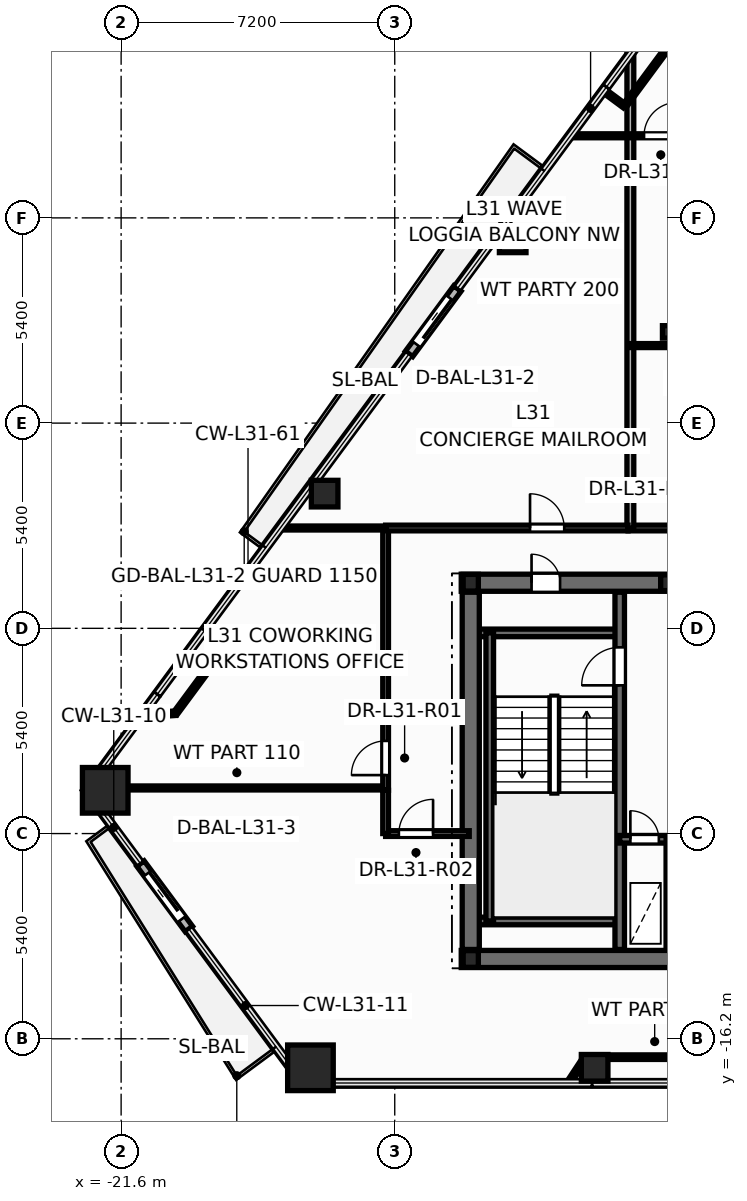
"""IFC4 building model, lengths in metres.
Left out: names, types, materials, properties, quantities, classifications, styles, units other than length and angle.
Written with IfcOpenShell. Run it as: python <this file> out.ifc"""

import sys

from ifc_helpers import new_model, si_unit, direction, frame, frame_2d, origin, origin_2d, place, context, subcontext, project, spatial, rectangle, hollow_rectangle, hollow_circle, i_section, extrude, element, fill, save


model = new_model("IFC4")
c1 = context("Model", 3, precision=1e-05, world=origin(), true_north=direction((0.0, 1.0)))
c2 = subcontext(c1, "Body", "Model", "MODEL_VIEW")
j1 = project(units=[si_unit("LENGTHUNIT", "METRE"), si_unit("PLANEANGLEUNIT", "RADIAN")], contexts=[c1])
p1 = place(None, origin())
s1 = spatial("IfcSite", under=j1, at=p1, CompositionType="ELEMENT")
p2 = place(p1, origin())
s2 = spatial("IfcBuilding", under=s1, at=p2, CompositionType="ELEMENT")
p3 = place(p2, frame((0.0, 0.0, 122.1)))
s3 = spatial("IfcBuildingStorey", under=s2, at=p3, CompositionType="ELEMENT", Elevation=122.1)
for number, where, z_axis, x_axis in (
    (1, (-22.019, -9.662, 0.0), (0.0, 0.0, 1.0), (1.0, 0.0, 0.0)),
    (2, (-16.618, -16.963, 0.0), (0.0, 0.0, 1.0), (1.0, 0.0, 0.0)),
):
    element("IfcColumn", number, at=place(p3, frame(where, z_axis=z_axis, x_axis=x_axis)), inside=s3, PredefinedType="COLUMN", context=c2, shape_type="SweptSolid", body=[
        extrude(hollow_rectangle(XDim=1.2, YDim=1.2, WallThickness=0.055, at=origin_2d()), origin(), (0.0, 0.0, 1.0), 3.6),
    ])
for number, where, z_axis, x_axis in (
    (3, (-9.14, -16.963, 0.0), (0.0, 0.0, 1.0), (1.0, 0.0, 0.0)),
    (4, (-11.296, 4.836, 0.0), (0.0, 0.0, 1.0), (1.0, 0.0, 0.0)),
    (5, (-16.245, -1.856, 0.0), (0.0, 0.0, 1.0), (1.0, 0.0, 0.0)),
):
    element("IfcColumn", number, at=place(p3, frame(where, z_axis=z_axis, x_axis=x_axis)), inside=s3, PredefinedType="COLUMN", context=c2, shape_type="SweptSolid", body=[
        extrude(hollow_circle(Radius=0.35, WallThickness=0.03, at=origin_2d()), origin(), (0.0, 0.0, 1.0), 3.6),
    ])
for number, where, z_axis, x_axis in (
    (6, (-12.4, -14.1, 0.0), (0.0, 0.0, 1.0), (1.0, 0.0, 0.0)),
    (7, (-12.4, -4.2, 0.0), (0.0, 0.0, 1.0), (1.0, 0.0, 0.0)),
):
    element("IfcColumn", number, at=place(p3, frame(where, z_axis=z_axis, x_axis=x_axis)), inside=s3, PredefinedType="COLUMN", context=c2, shape_type="SweptSolid", body=[
        extrude(i_section(OverallWidth=0.4, OverallDepth=0.44, WebThickness=0.028, FlangeThickness=0.04, at=origin_2d()), origin(), (0.0, 0.0, 1.0), 3.6),
    ])
p4 = place(p3, frame((-7.2, -4.2, 0.0), z_axis=(0.0, 0.0, 1.0), x_axis=(1.0, 0.0, 0.0)))
e8 = element("IfcColumn", 8, at=p4, inside=s3, PredefinedType="PILASTER", context=c2, shape_type="SweptSolid", body=[
    extrude(i_section(OverallWidth=0.405, OverallDepth=0.414, WebThickness=0.022, FlangeThickness=0.032, at=origin_2d()), origin(), (0.0, 0.0, 1.0), 3.6),
])
p5 = place(p3, frame((-7.2, 2.4, 0.0), z_axis=(0.0, 0.0, 1.0), x_axis=(1.0, 0.0, 0.0)))
e9 = element("IfcColumn", 9, at=p5, inside=s3, PredefinedType="COLUMN", context=c2, shape_type="SweptSolid", body=[
    extrude(i_section(OverallWidth=0.311, OverallDepth=0.327, WebThickness=0.016, FlangeThickness=0.025, at=origin_2d()), origin(), (0.0, 0.0, 1.0), 3.6),
])
p6 = place(p3, frame((-12.751, 3.541, -0.015), z_axis=(0.0, 0.0, 1.0), x_axis=(-0.594638042479, -0.80399353134, 0.0)))
e10 = element("IfcWall", 10, at=p6, inside=s3, PredefinedType="STANDARD", context=c2, shape_type="SweptSolid", body=[
    extrude(rectangle(XDim=2.14, YDim=0.24, at=frame_2d((1.07, 0.0))), origin(), (0.0, 0.0, 1.0), 2.807),
])
p7 = place(p6, frame((0.32, 0.0, 0.015)))
e11 = element("IfcOpeningElement", 11, at=p7, cuts=e10, PredefinedType="OPENING", context=c2, shape_type="SweptSolid", body=[
    extrude(rectangle(XDim=1.506, YDim=2.204, at=frame_2d((0.75, 1.102))), frame((0.0, 0.13, 0.0), z_axis=(0.0, -1.0, 0.0), x_axis=(1.0, 0.0, 0.0)), (0.0, 0.0, 1.0), 0.26),
])
p8 = place(p3, frame((-21.09, -11.59, -0.015), z_axis=(0.0, 0.0, 1.0), x_axis=(0.594638042479, -0.80399353134, 0.0)))
e12 = element("IfcWall", 12, at=p8, inside=s3, PredefinedType="STANDARD", context=c2, shape_type="SweptSolid", body=[
    extrude(rectangle(XDim=2.14, YDim=0.24, at=frame_2d((1.07, 0.0))), origin(), (0.0, 0.0, 1.0), 2.807),
])
p9 = place(p8, frame((0.32, 0.0, 0.015)))
e13 = element("IfcOpeningElement", 13, at=p9, cuts=e12, PredefinedType="OPENING", context=c2, shape_type="SweptSolid", body=[
    extrude(rectangle(XDim=1.506, YDim=2.204, at=frame_2d((0.75, 1.102))), frame((0.0, 0.13, 0.0), z_axis=(0.0, -1.0, 0.0), x_axis=(1.0, 0.0, 0.0)), (0.0, 0.0, 1.0), 0.26),
])
p10 = place(p3, frame((-12.65, -14.1, 0.0), z_axis=(0.0, 0.0, 1.0), x_axis=(1.0, 0.0, 0.0)))
e14 = element("IfcWall", 14, at=p10, inside=s3, PredefinedType="SHEAR", context=c2, shape_type="SweptSolid", body=[
    extrude(rectangle(XDim=25.3, YDim=0.45, at=frame_2d((12.65, 0.0))), origin(), (0.0, 0.0, 1.0), 3.6),
])
p11 = place(p3, frame((-12.65, -4.2, 0.0), z_axis=(0.0, 0.0, 1.0), x_axis=(1.0, 0.0, 0.0)))
e15 = element("IfcWall", 15, at=p11, inside=s3, PredefinedType="SHEAR", context=c2, shape_type="SweptSolid", body=[
    extrude(rectangle(XDim=25.3, YDim=0.45, at=frame_2d((12.65, 0.0))), origin(), (0.0, 0.0, 1.0), 3.6),
])
p12 = place(p11, frame((1.85, 0.0, 0.0)))
e16 = element("IfcOpeningElement", 16, at=p12, cuts=e15, PredefinedType="OPENING", context=c2, shape_type="SweptSolid", body=[
    extrude(rectangle(XDim=0.756, YDim=2.054, at=frame_2d((0.375, 1.027))), frame((0.0, 0.235, 0.0), z_axis=(0.0, -1.0, 0.0), x_axis=(1.0, 0.0, 0.0)), (0.0, 0.0, 1.0), 0.47),
])
p13 = place(p11, frame((21.85, 0.0, 0.0)))
e17 = element("IfcOpeningElement", 17, at=p13, cuts=e15, PredefinedType="OPENING", context=c2, shape_type="SweptSolid", body=[
    extrude(rectangle(XDim=0.756, YDim=2.054, at=frame_2d((0.375, 1.027))), frame((0.0, 0.235, 0.0), z_axis=(0.0, -1.0, 0.0), x_axis=(1.0, 0.0, 0.0)), (0.0, 0.0, 1.0), 0.47),
])
p14 = place(p11, frame((23.5, 0.0, 0.0)))
e18 = element("IfcOpeningElement", 18, at=p14, cuts=e15, PredefinedType="OPENING", context=c2, shape_type="SweptSolid", body=[
    extrude(rectangle(XDim=0.756, YDim=2.054, at=frame_2d((0.375, 1.027))), frame((0.0, 0.235, 0.0), z_axis=(0.0, -1.0, 0.0), x_axis=(1.0, 0.0, 0.0)), (0.0, 0.0, 1.0), 0.47),
])
p15 = place(p11, frame((5.85, 0.0, 0.0)))
e19 = element("IfcOpeningElement", 19, at=p15, cuts=e15, PredefinedType="OPENING", context=c2, shape_type="SweptSolid", body=[
    extrude(rectangle(XDim=1.006, YDim=2.104, at=frame_2d((0.5, 1.052))), frame((0.0, 0.235, 0.0), z_axis=(0.0, -1.0, 0.0), x_axis=(1.0, 0.0, 0.0)), (0.0, 0.0, 1.0), 0.47),
])
p16 = place(p11, frame((10.35, 0.0, 0.0)))
e20 = element("IfcOpeningElement", 20, at=p16, cuts=e15, PredefinedType="OPENING", context=c2, shape_type="SweptSolid", body=[
    extrude(rectangle(XDim=1.406, YDim=2.154, at=frame_2d((0.7, 1.077))), frame((0.0, 0.235, 0.0), z_axis=(0.0, -1.0, 0.0), x_axis=(1.0, 0.0, 0.0)), (0.0, 0.0, 1.0), 0.47),
])
p17 = place(p11, frame((18.45, 0.0, 0.0)))
e21 = element("IfcOpeningElement", 21, at=p17, cuts=e15, PredefinedType="OPENING", context=c2, shape_type="SweptSolid", body=[
    extrude(rectangle(XDim=1.006, YDim=2.104, at=frame_2d((0.5, 1.052))), frame((0.0, 0.235, 0.0), z_axis=(0.0, -1.0, 0.0), x_axis=(1.0, 0.0, 0.0)), (0.0, 0.0, 1.0), 0.47),
])
for number, where, z_axis, x_axis in (
    (22, (-12.35, -5.52, 0.0), (0.0, 0.0, 1.0), (1.0, 0.0, 0.0)),
    (23, (-12.35, -13.1, 0.0), (0.0, 0.0, 1.0), (1.0, 0.0, 0.0)),
):
    element("IfcWall", number, at=place(p3, frame(where, z_axis=z_axis, x_axis=x_axis)), inside=s3, PredefinedType="SOLIDWALL", context=c2, shape_type="SweptSolid", body=[
        extrude(rectangle(XDim=3.87, YDim=0.2, at=frame_2d((1.935, 0.0))), origin(), (0.0, 0.0, 1.0), 3.6),
    ])
p18 = place(p3, frame((-11.9, -13.1, 0.0), z_axis=(0.0, 0.0, 1.0), x_axis=(0.0, 1.0, 0.0)))
e24 = element("IfcWall", 24, at=p18, inside=s3, PredefinedType="SOLIDWALL", context=c2, shape_type="SweptSolid", body=[
    extrude(rectangle(XDim=7.58, YDim=0.2, at=frame_2d((3.79, 0.0))), origin(), (0.0, 0.0, 1.0), 3.6),
])
p19 = place(p3, frame((-8.48, -13.85, 0.0), z_axis=(0.0, 0.0, 1.0), x_axis=(0.0, 1.0, 0.0)))
e25 = element("IfcWall", 25, at=p19, inside=s3, PredefinedType="SHEAR", context=c2, shape_type="SweptSolid", body=[
    extrude(rectangle(XDim=9.4, YDim=0.25, at=frame_2d((4.7, 0.0))), origin(), (0.0, 0.0, 1.0), 3.6),
])
p20 = place(p19, frame((6.95, 0.0, 0.0)))
e26 = element("IfcOpeningElement", 26, at=p20, cuts=e25, PredefinedType="OPENING", context=c2, shape_type="SweptSolid", body=[
    extrude(rectangle(XDim=1.006, YDim=2.104, at=frame_2d((0.5, 1.052))), frame((0.0, 0.135, 0.0), z_axis=(0.0, -1.0, 0.0), x_axis=(1.0, 0.0, 0.0)), (0.0, 0.0, 1.0), 0.27),
])
p21 = place(p3, frame((-8.48, -10.95, 0.0), z_axis=(0.0, 0.0, 1.0), x_axis=(1.0, 0.0, 0.0)))
e27 = element("IfcWall", 27, at=p21, inside=s3, PredefinedType="SOLIDWALL", context=c2, shape_type="SweptSolid", body=[
    extrude(rectangle(XDim=3.36, YDim=0.2, at=frame_2d((1.68, 0.0))), origin(), (0.0, 0.0, 1.0), 3.6),
])
p22 = place(p21, frame((0.28, 0.0, 0.0)))
e28 = element("IfcOpeningElement", 28, at=p22, cuts=e27, PredefinedType="OPENING", context=c2, shape_type="SweptSolid", body=[
    extrude(rectangle(XDim=0.756, YDim=2.054, at=frame_2d((0.375, 1.027))), frame((0.0, 0.11, 0.0), z_axis=(0.0, -1.0, 0.0), x_axis=(1.0, 0.0, 0.0)), (0.0, 0.0, 1.0), 0.22),
])
p23 = place(p21, frame((1.85, 0.0, 0.0)))
e29 = element("IfcOpeningElement", 29, at=p23, cuts=e27, PredefinedType="OPENING", context=c2, shape_type="SweptSolid", body=[
    extrude(rectangle(XDim=1.106, YDim=2.104, at=frame_2d((0.55, 1.052))), frame((0.0, 0.11, 0.0), z_axis=(0.0, -1.0, 0.0), x_axis=(1.0, 0.0, 0.0)), (0.0, 0.0, 1.0), 0.22),
])
p24 = place(p3, frame((-7.18, -13.85, 0.0), z_axis=(0.0, 0.0, 1.0), x_axis=(0.0, 1.0, 0.0)))
e30 = element("IfcWall", 30, at=p24, inside=s3, PredefinedType="PARTITIONING", context=c2, shape_type="SweptSolid", body=[
    extrude(rectangle(XDim=2.9, YDim=0.16, at=frame_2d((1.45, 0.0))), origin(), (0.0, 0.0, 1.0), 2.475),
])
p25 = place(p3, frame((-12.4, -13.85, 0.0), z_axis=(0.0, 0.0, 1.0), x_axis=(0.0, 1.0, 0.0)))
e31 = element("IfcWall", 31, at=p25, inside=s3, PredefinedType="SHEAR", context=c2, shape_type="SweptSolid", body=[
    extrude(rectangle(XDim=9.4, YDim=0.45, at=frame_2d((4.7, 0.0))), origin(), (0.0, 0.0, 1.0), 3.6),
])
p26 = place(p3, frame((-8.26, -2.76, 0.0), z_axis=(0.0, 0.0, 1.0), x_axis=(1.0, 0.0, 0.0)))
e32 = element("IfcWall", 32, at=p26, inside=s3, PredefinedType="PARTITIONING", context=c2, shape_type="SweptSolid", body=[
    extrude(rectangle(XDim=8.9, YDim=0.15, at=frame_2d((4.45, 0.0))), origin(), (0.0, 0.0, 1.0), 2.325),
])
p27 = place(p26, frame((2.627, 0.0, 0.0)))
e33 = element("IfcOpeningElement", 33, at=p27, cuts=e32, PredefinedType="OPENING", context=c2, shape_type="SweptSolid", body=[
    extrude(rectangle(XDim=0.906, YDim=2.104, at=frame_2d((0.45, 1.052))), frame((0.0, 0.085, 0.0), z_axis=(0.0, -1.0, 0.0), x_axis=(1.0, 0.0, 0.0)), (0.0, 0.0, 1.0), 0.17),
])
p28 = place(p3, frame((-22.47, -9.6, 0.0), z_axis=(0.0, 0.0, 1.0), x_axis=(1.0, 0.0, 0.0)))
e34 = element("IfcWall", 34, at=p28, inside=s3, PredefinedType="PARTITIONING", context=c2, shape_type="SweptSolid", body=[
    extrude(rectangle(XDim=7.83, YDim=0.105, at=frame_2d((3.915, 0.0))), origin(), (0.0, 0.0, 1.0), 2.325),
])
p29 = place(p3, frame((-8.2, -2.76, 0.0), z_axis=(0.0, 0.0, 1.0), x_axis=(0.0, 1.0, 0.0)))
e35 = element("IfcWall", 35, at=p29, inside=s3, PredefinedType="PARTITIONING", context=c2, shape_type="SweptSolid", body=[
    extrude(rectangle(XDim=12.454, YDim=0.18, at=frame_2d((6.227, 0.0))), origin(), (0.0, 0.0, 1.0), 2.617),
])
p30 = place(p3, frame((-14.64, -9.66, 0.0), z_axis=(0.0, 0.0, 1.0), x_axis=(0.0, 1.0, 0.0)))
e36 = element("IfcWall", 36, at=p30, inside=s3, PredefinedType="PARTITIONING", context=c2, shape_type="SweptSolid", body=[
    extrude(rectangle(XDim=6.9, YDim=0.15, at=frame_2d((3.45, 0.0))), origin(), (0.0, 0.0, 1.0), 2.325),
])
p31 = place(p30, frame((0.398, 0.0, 0.0)))
e37 = element("IfcOpeningElement", 37, at=p31, cuts=e36, PredefinedType="OPENING", context=c2, shape_type="SweptSolid", body=[
    extrude(rectangle(XDim=0.906, YDim=2.104, at=frame_2d((0.45, 1.052))), frame((0.0, 0.085, 0.0), z_axis=(0.0, -1.0, 0.0), x_axis=(1.0, 0.0, 0.0)), (0.0, 0.0, 1.0), 0.17),
])
p32 = place(p3, frame((-14.64, -2.76, 0.0), z_axis=(0.0, 0.0, 1.0), x_axis=(1.0, 0.0, 0.0)))
e38 = element("IfcWall", 38, at=p32, inside=s3, PredefinedType="PARTITIONING", context=c2, shape_type="SweptSolid", body=[
    extrude(rectangle(XDim=6.378, YDim=0.15, at=frame_2d((3.189, 0.0))), origin(), (0.0, 0.0, 1.0), 3.35),
])
p33 = place(p32, frame((3.8, 0.0, 0.0)))
e39 = element("IfcOpeningElement", 39, at=p33, cuts=e38, PredefinedType="OPENING", context=c2, shape_type="SweptSolid", body=[
    extrude(rectangle(XDim=0.906, YDim=2.104, at=frame_2d((0.45, 1.052))), frame((0.0, 0.085, 0.0), z_axis=(0.0, -1.0, 0.0), x_axis=(1.0, 0.0, 0.0)), (0.0, 0.0, 1.0), 0.17),
])
p34 = place(p3, frame((-9.779, 7.56, 0.0), z_axis=(0.0, 0.0, 1.0), x_axis=(1.0, 0.0, 0.0)))
e40 = element("IfcWall", 40, at=p34, inside=s3, PredefinedType="PARTITIONING", context=c2, shape_type="SweptSolid", body=[
    extrude(rectangle(XDim=4.819, YDim=0.105, at=frame_2d((2.409, 0.0))), origin(), (0.0, 0.0, 1.0), 2.617),
])
p35 = place(p34, frame((1.939, 0.0, 0.0)))
e41 = element("IfcOpeningElement", 41, at=p35, cuts=e40, PredefinedType="OPENING", context=c2, shape_type="SweptSolid", body=[
    extrude(rectangle(XDim=0.886, YDim=2.104, at=frame_2d((0.44, 1.052))), frame((0.0, 0.062, 0.0), z_axis=(0.0, -1.0, 0.0), x_axis=(1.0, 0.0, 0.0)), (0.0, 0.0, 1.0), 0.125),
])
p36 = place(p3, frame((-9.376, -16.683, 0.0), z_axis=(0.0, 0.0, 1.0), x_axis=(1.0, 0.0, 0.0)))
e42 = element("IfcWall", 42, at=p36, inside=s3, PredefinedType="PARTITIONING", context=c2, shape_type="SweptSolid", body=[
    extrude(rectangle(XDim=3.632, YDim=0.12, at=frame_2d((1.816, 0.0))), origin(), (0.0, 0.0, 1.0), 2.792),
])
p37 = place(p3, frame((-8.2, 2.04, 0.0), z_axis=(0.0, 0.0, 1.0), x_axis=(1.0, 0.0, 0.0)))
e43 = element("IfcWall", 43, at=p37, inside=s3, PredefinedType="PARTITIONING", context=c2, shape_type="SweptSolid", body=[
    extrude(rectangle(XDim=3.178, YDim=0.105, at=frame_2d((1.589, 0.0))), origin(), (0.0, 0.0, 1.0), 2.325),
])
p38 = place(p37, frame((2.022, 0.0, 0.0)))
e44 = element("IfcOpeningElement", 44, at=p38, cuts=e43, PredefinedType="OPENING", context=c2, shape_type="SweptSolid", body=[
    extrude(rectangle(XDim=0.886, YDim=2.104, at=frame_2d((0.44, 1.052))), frame((0.0, 0.062, 0.0), z_axis=(0.0, -1.0, 0.0), x_axis=(1.0, 0.0, 0.0)), (0.0, 0.0, 1.0), 0.125),
])
p39 = place(p3, frame((-17.411, -2.76, 0.0), z_axis=(0.0, 0.0, 1.0), x_axis=(1.0, 0.0, 0.0)))
e45 = element("IfcWall", 45, at=p39, inside=s3, PredefinedType="PARTITIONING", context=c2, shape_type="SweptSolid", body=[
    extrude(rectangle(XDim=2.771, YDim=0.105, at=frame_2d((1.386, 0.0))), origin(), (0.0, 0.0, 1.0), 2.792),
])
p40 = place(p3, frame((-18.789, -5.766, 0.0), z_axis=(0.0, 0.0, 1.0), x_axis=(-0.594571315603, -0.804042878622, 0.0)))
e46 = element("IfcWall", 46, at=p40, inside=s3, PredefinedType="PARTITIONING", context=c2, shape_type="SweptSolid", body=[
    extrude(rectangle(XDim=2.323, YDim=0.12, at=frame_2d((1.161, 0.0))), origin(), (0.0, 0.0, 1.0), 3.35),
])
p41 = place(p3, frame((-6.971, 10.212, 0.0), z_axis=(0.0, 0.0, 1.0), x_axis=(-0.594589014846, -0.804029790135, 0.0)))
e47 = element("IfcWall", 47, at=p41, inside=s3, PredefinedType="PARTITIONING", context=c2, shape_type="SweptSolid", body=[
    extrude(rectangle(XDim=2.323, YDim=0.12, at=frame_2d((1.162, 0.0))), origin(), (0.0, 0.0, 1.0), 3.35),
])
p42 = place(p3, frame((-14.64, -10.8, 0.0), z_axis=(0.0, 0.0, 1.0), x_axis=(1.0, 0.0, 0.0)))
e48 = element("IfcWall", 48, at=p42, inside=s3, PredefinedType="PARTITIONING", context=c2, shape_type="SweptSolid", body=[
    extrude(rectangle(XDim=2.2, YDim=0.15, at=frame_2d((1.1, 0.0))), origin(), (0.0, 0.0, 1.0), 2.792),
])
p43 = place(p42, frame((0.349, 0.0, 0.0)))
e49 = element("IfcOpeningElement", 49, at=p43, cuts=e48, PredefinedType="OPENING", context=c2, shape_type="SweptSolid", body=[
    extrude(rectangle(XDim=0.906, YDim=2.104, at=frame_2d((0.45, 1.052))), frame((0.0, 0.085, 0.0), z_axis=(0.0, -1.0, 0.0), x_axis=(1.0, 0.0, 0.0)), (0.0, 0.0, 1.0), 0.17),
])
p44 = place(p3, frame((-14.64, -10.8, 0.0), z_axis=(0.0, 0.0, 1.0), x_axis=(0.0, 1.0, 0.0)))
e50 = element("IfcWall", 50, at=p44, inside=s3, PredefinedType="PARTITIONING", context=c2, shape_type="SweptSolid", body=[
    extrude(rectangle(XDim=1.138, YDim=0.15, at=frame_2d((0.569, 0.0))), origin(), (0.0, 0.0, 1.0), 3.35),
])
p45 = place(p3, frame((-20.17, -7.633, 0.0), z_axis=(0.0, 0.0, 1.0), x_axis=(-0.997720805556, -0.067477360354, 0.0)))
e51 = element("IfcWall", 51, at=p45, inside=s3, PredefinedType="PARTITIONING", context=c2, shape_type="SweptSolid", body=[
    extrude(rectangle(XDim=0.879, YDim=0.12, at=frame_2d((0.439, 0.0))), origin(), (0.0, 0.0, 1.0), 2.792),
])
p46 = place(p3, frame((-9.818, -17.353, 0.0), z_axis=(0.0, 0.0, 1.0), x_axis=(0.550409775631, 0.834894651372, 0.0)))
e52 = element("IfcWall", 52, at=p46, inside=s3, PredefinedType="PARTITIONING", context=c2, shape_type="SweptSolid", body=[
    extrude(rectangle(XDim=0.802, YDim=0.12, at=frame_2d((0.401, 0.0))), origin(), (0.0, 0.0, 1.0), 2.792),
])
for number, where, z_axis, x_axis in (
    (53, (-8.353, 8.344, 0.0), (0.0, 0.0, 1.0), (-0.804, 0.595, 0.0)),
    (54, (-19.327, -5.367, 0.0), (0.0, 0.0, 1.0), (0.804, -0.595, 0.0)),
):
    element("IfcWall", number, at=place(p3, frame(where, z_axis=z_axis, x_axis=x_axis)), inside=s3, PredefinedType="PARTITIONING", context=c2, shape_type="SweptSolid", body=[
        extrude(rectangle(XDim=0.67, YDim=0.12, at=frame_2d((0.335, 0.0))), origin(), (0.0, 0.0, 1.0), 2.792),
    ])
p47 = place(p7, origin())
e55 = element("IfcDoor", 55, at=p47, inside=s3, OperationType="SLIDING_TO_RIGHT", PredefinedType="DOOR", context=c2, shape_type="SweptSolid", body=[
    extrude(rectangle(XDim=1.5, YDim=2.2, at=frame_2d((0.75, 1.1))), frame((0.0, 0.025, 0.0), z_axis=(0.0, -1.0, 0.0), x_axis=(1.0, 0.0, 0.0)), (0.0, 0.0, 1.0), 0.05),
])
fill(e11, e55)
p48 = place(p9, origin())
e56 = element("IfcDoor", 56, at=p48, inside=s3, OperationType="SLIDING_TO_RIGHT", PredefinedType="DOOR", context=c2, shape_type="SweptSolid", body=[
    extrude(rectangle(XDim=1.5, YDim=2.2, at=frame_2d((0.75, 1.1))), frame((0.0, 0.025, 0.0), z_axis=(0.0, -1.0, 0.0), x_axis=(1.0, 0.0, 0.0)), (0.0, 0.0, 1.0), 0.05),
])
fill(e13, e56)
p49 = place(p20, origin())
e57 = element("IfcDoor", 57, at=p49, inside=s3, OperationType="SINGLE_SWING_LEFT", PredefinedType="DOOR", context=c2, shape_type="SweptSolid", body=[
    extrude(rectangle(XDim=1.0, YDim=2.1, at=frame_2d((0.5, 1.05))), frame((0.0, 0.025, 0.0), z_axis=(0.0, -1.0, 0.0), x_axis=(1.0, 0.0, 0.0)), (0.0, 0.0, 1.0), 0.05),
])
fill(e26, e57)
p50 = place(p22, origin())
e58 = element("IfcDoor", 58, at=p50, inside=s3, OperationType="SINGLE_SWING_LEFT", PredefinedType="DOOR", context=c2, shape_type="SweptSolid", body=[
    extrude(rectangle(XDim=0.75, YDim=2.05, at=frame_2d((0.375, 1.025))), frame((0.0, 0.025, 0.0), z_axis=(0.0, -1.0, 0.0), x_axis=(1.0, 0.0, 0.0)), (0.0, 0.0, 1.0), 0.05),
])
fill(e28, e58)
p51 = place(p12, origin())
e59 = element("IfcDoor", 59, at=p51, inside=s3, OperationType="SINGLE_SWING_LEFT", PredefinedType="DOOR", context=c2, shape_type="SweptSolid", body=[
    extrude(rectangle(XDim=0.75, YDim=2.05, at=frame_2d((0.375, 1.025))), frame((0.0, 0.025, 0.0), z_axis=(0.0, -1.0, 0.0), x_axis=(1.0, 0.0, 0.0)), (0.0, 0.0, 1.0), 0.05),
])
fill(e16, e59)
p52 = place(p31, origin())
e60 = element("IfcDoor", 60, at=p52, inside=s3, OperationType="SINGLE_SWING_LEFT", PredefinedType="DOOR", context=c2, shape_type="SweptSolid", body=[
    extrude(rectangle(XDim=0.9, YDim=2.1, at=frame_2d((0.45, 1.05))), frame((0.0, 0.025, 0.0), z_axis=(0.0, -1.0, 0.0), x_axis=(1.0, 0.0, 0.0)), (0.0, 0.0, 1.0), 0.05),
])
fill(e37, e60)
p53 = place(p43, origin())
e61 = element("IfcDoor", 61, at=p53, inside=s3, OperationType="SINGLE_SWING_RIGHT", PredefinedType="DOOR", context=c2, shape_type="SweptSolid", body=[
    extrude(rectangle(XDim=0.9, YDim=2.1, at=frame_2d((0.45, 1.05))), frame((0.0, 0.025, 0.0), z_axis=(0.0, -1.0, 0.0), x_axis=(1.0, 0.0, 0.0)), (0.0, 0.0, 1.0), 0.05),
])
fill(e49, e61)
p54 = place(p33, origin())
e62 = element("IfcDoor", 62, at=p54, inside=s3, OperationType="SINGLE_SWING_LEFT", PredefinedType="DOOR", context=c2, shape_type="SweptSolid", body=[
    extrude(rectangle(XDim=0.9, YDim=2.1, at=frame_2d((0.45, 1.05))), frame((0.0, 0.025, 0.0), z_axis=(0.0, -1.0, 0.0), x_axis=(1.0, 0.0, 0.0)), (0.0, 0.0, 1.0), 0.05),
])
fill(e39, e62)
p55 = place(p35, origin())
e63 = element("IfcDoor", 63, at=p55, inside=s3, OperationType="SINGLE_SWING_RIGHT", PredefinedType="DOOR", context=c2, shape_type="SweptSolid", body=[
    extrude(rectangle(XDim=0.88, YDim=2.1, at=frame_2d((0.44, 1.05))), frame((0.0, 0.025, 0.0), z_axis=(0.0, -1.0, 0.0), x_axis=(1.0, 0.0, 0.0)), (0.0, 0.0, 1.0), 0.05),
])
fill(e41, e63)
save(model, sys.argv[1])
